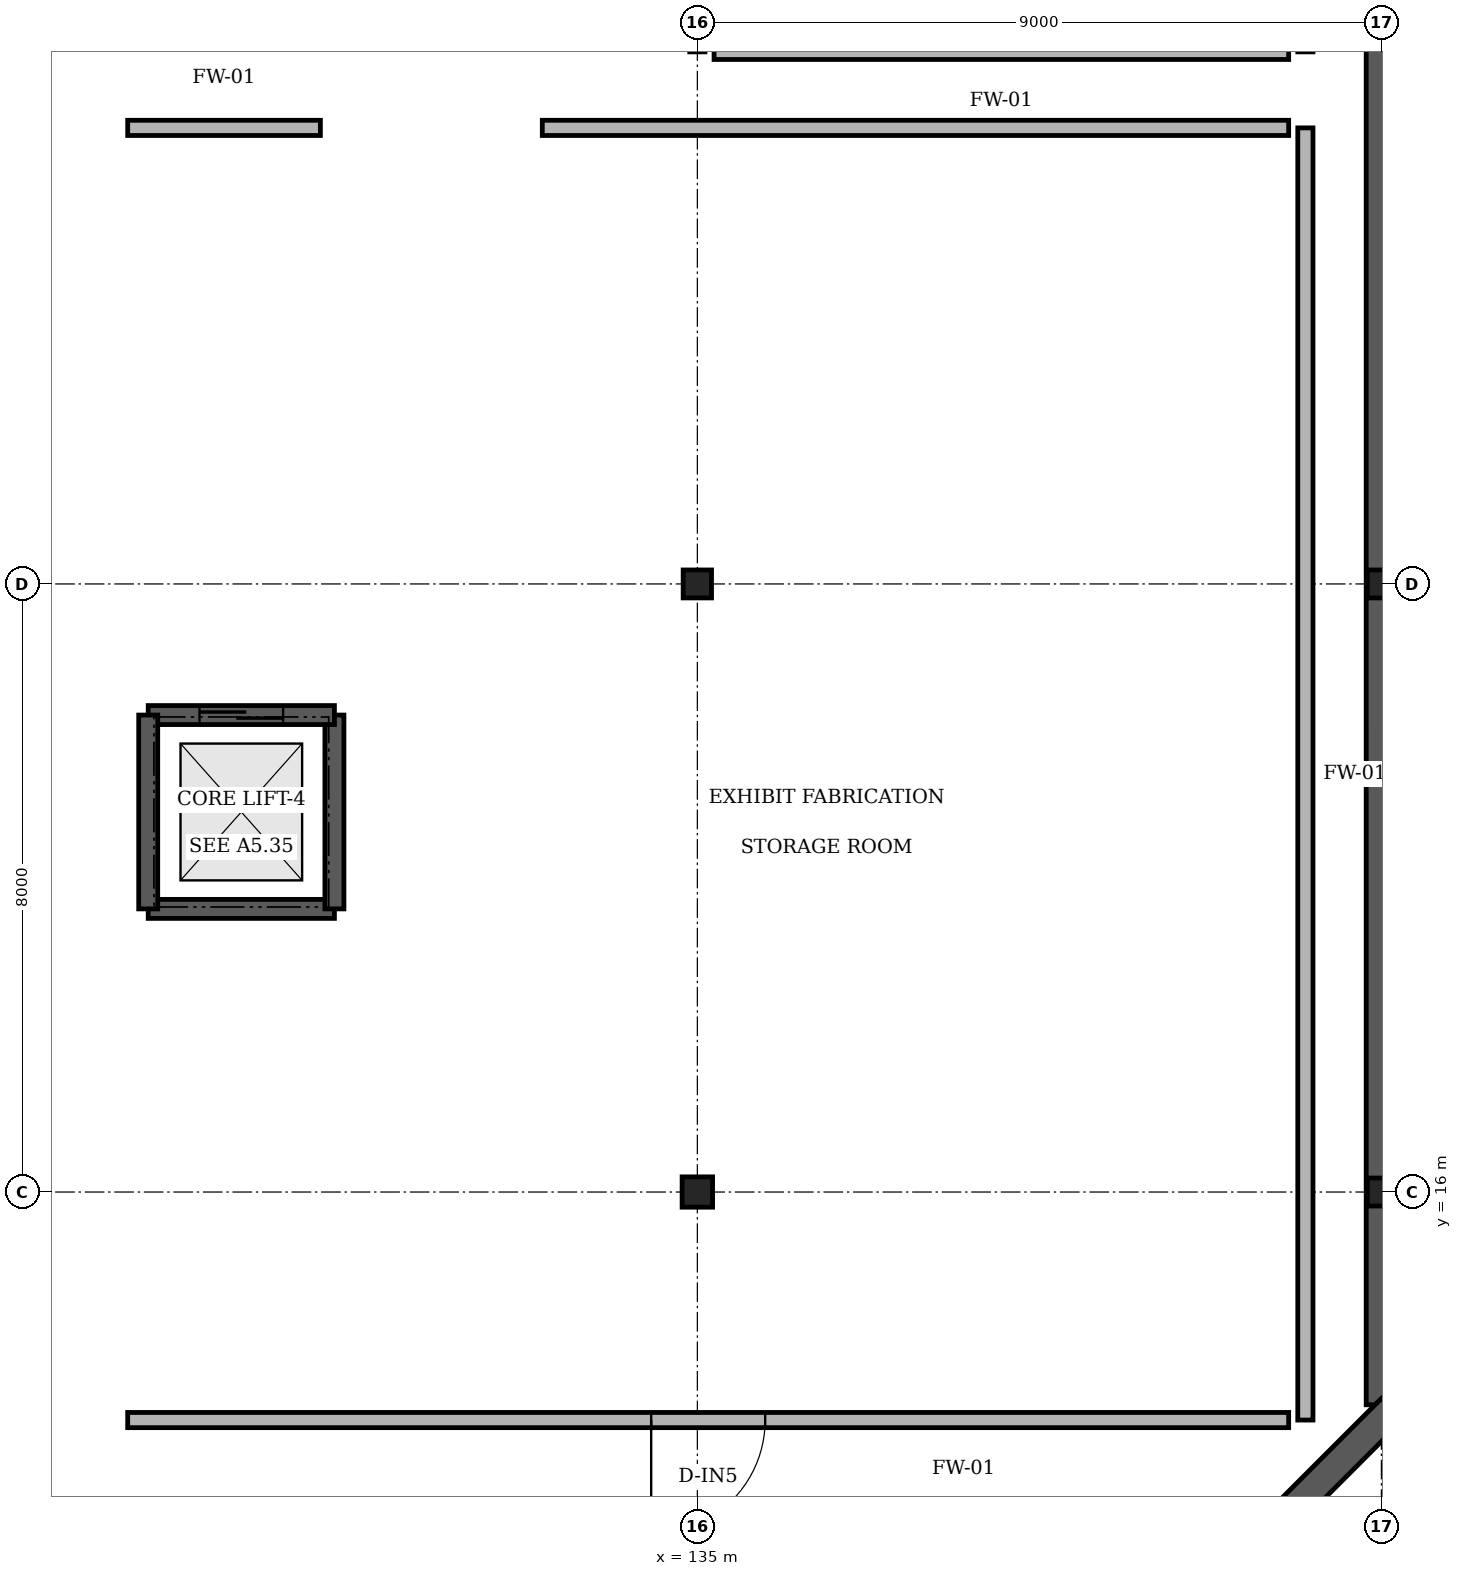
"""IFC4 building model, lengths in metres.
Left out: names, types, materials, properties, quantities, classifications, styles, units other than length and angle.
Written with IfcOpenShell. Run it as: python <this file> out.ifc"""

import sys

from ifc_helpers import new_model, si_unit, direction, frame, frame_2d, origin, origin_2d, place, context, subcontext, project, spatial, rectangle, i_section, extrude, element, fill, save


model = new_model("IFC4")
c1 = context("Model", 3, precision=1e-05, world=origin(), true_north=direction((0.0, 1.0)))
c2 = subcontext(c1, "Body", "Model", "MODEL_VIEW")
j1 = project(units=[si_unit("LENGTHUNIT", "METRE"), si_unit("PLANEANGLEUNIT", "RADIAN")], contexts=[c1])
p1 = place(None, origin())
s1 = spatial("IfcSite", under=j1, at=p1, CompositionType="ELEMENT")
p2 = place(p1, origin())
s2 = spatial("IfcBuilding", under=s1, at=p2, CompositionType="ELEMENT")
p3 = place(p2, frame((0.0, 0.0, -4.8)))
s3 = spatial("IfcBuildingStorey", under=s2, at=p3, CompositionType="ELEMENT", Elevation=-4.8)
p4 = place(p3, frame((135.0, 16.0, -0.35), z_axis=(0.0, 0.0, 1.0), x_axis=(1.0, 0.0, 0.0)))
e1 = element("IfcColumn", 1, at=p4, inside=s3, PredefinedType="COLUMN", context=c2, shape_type="SweptSolid", body=[
    extrude(i_section(OverallWidth=0.401, OverallDepth=0.399, WebThickness=0.025, FlangeThickness=0.04, FilletRadius=0.015, at=origin_2d()), origin(), (0.0, 0.0, 1.0), 5.15),
])
for number, where, z_axis, x_axis in (
    (2, (135.0, 24.0, -0.35), (0.0, 0.0, 1.0), (1.0, 0.0, 0.0)),
    (3, (144.0, 16.0, -0.35), (0.0, 0.0, 1.0), (1.0, 0.0, 0.0)),
    (4, (144.0, 24.0, -0.35), (0.0, 0.0, 1.0), (1.0, 0.0, 0.0)),
):
    element("IfcColumn", number, at=place(p3, frame(where, z_axis=z_axis, x_axis=x_axis)), inside=s3, PredefinedType="COLUMN", context=c2, shape_type="SweptSolid", body=[
        extrude(i_section(OverallWidth=0.373, OverallDepth=0.368, WebThickness=0.015, FlangeThickness=0.024, FilletRadius=0.015, at=origin_2d()), origin(), (0.0, 0.0, 1.0), 5.15),
    ])
p5 = place(p3, frame((144.0, 47.2, -0.35), z_axis=(0.0, 0.0, 1.0), x_axis=(0.0, -1.0, 0.0)))
e5 = element("IfcWall", 5, at=p5, inside=s3, PredefinedType="USERDEFINED", context=c2, shape_type="SweptSolid", body=[
    extrude(rectangle(XDim=33.999, YDim=0.4, at=frame_2d((17.0, 0.0))), origin(), (0.0, 0.0, 1.0), 3.9),
])
p6 = place(p3, frame((144.141, 13.143, -0.35), z_axis=(0.0, 0.0, 1.0), x_axis=(-0.706876640674, -0.70733684682, 0.0)))
e6 = element("IfcWall", 6, at=p6, inside=s3, PredefinedType="USERDEFINED", context=c2, shape_type="SweptSolid", body=[
    extrude(rectangle(XDim=2.122, YDim=0.4, at=frame_2d((1.061, 0.0))), origin(), (0.0, 0.0, 1.0), 3.9),
])
p7 = place(p3, frame((127.775, 19.725, -0.35), z_axis=(0.0, 0.0, 1.0), x_axis=(1.0, 0.0, 0.0)))
e7 = element("IfcWall", 7, at=p7, inside=s3, PredefinedType="SOLIDWALL", context=c2, shape_type="SweptSolid", body=[
    extrude(rectangle(XDim=2.45, YDim=0.25, at=frame_2d((1.225, 0.0))), origin(), (0.0, 0.0, 1.0), 5.15),
])
p8 = place(p3, frame((130.225, 19.725, -0.35), z_axis=(0.0, 0.0, 1.0), x_axis=(0.0, 1.0, 0.0)))
e8 = element("IfcWall", 8, at=p8, inside=s3, PredefinedType="SOLIDWALL", context=c2, shape_type="SweptSolid", body=[
    extrude(rectangle(XDim=2.55, YDim=0.25, at=frame_2d((1.275, 0.0))), origin(), (0.0, 0.0, 1.0), 5.15),
])
p9 = place(p3, frame((130.225, 22.275, -0.35), z_axis=(0.0, 0.0, 1.0), x_axis=(-1.0, 0.0, 0.0)))
e9 = element("IfcWall", 9, at=p9, inside=s3, PredefinedType="SOLIDWALL", context=c2, shape_type="SweptSolid", body=[
    extrude(rectangle(XDim=2.45, YDim=0.25, at=frame_2d((1.225, 0.0))), origin(), (0.0, 0.0, 1.0), 5.15),
])
p10 = place(p9, frame((0.675, 0.0, 0.35)))
e10 = element("IfcOpeningElement", 10, at=p10, cuts=e9, PredefinedType="OPENING", context=c2, shape_type="SweptSolid", body=[
    extrude(rectangle(XDim=1.1, YDim=2.2, at=frame_2d((0.55, 1.1))), frame((0.0, 0.135, 0.0), z_axis=(0.0, -1.0, 0.0), x_axis=(1.0, 0.0, 0.0)), (0.0, 0.0, 1.0), 0.27),
])
p11 = place(p3, frame((127.775, 22.275, -0.35), z_axis=(0.0, 0.0, 1.0), x_axis=(0.0, -1.0, 0.0)))
e11 = element("IfcWall", 11, at=p11, inside=s3, PredefinedType="SOLIDWALL", context=c2, shape_type="SweptSolid", body=[
    extrude(rectangle(XDim=2.55, YDim=0.25, at=frame_2d((1.275, 0.0))), origin(), (0.0, 0.0, 1.0), 5.15),
])
p12 = place(p3, frame((143.0, 30.0, 0.0), z_axis=(0.0, 0.0, 1.0), x_axis=(0.0, -1.0, 0.0)))
e12 = element("IfcWall", 12, at=p12, inside=s3, PredefinedType="SOLIDWALL", context=c2, shape_type="SweptSolid", body=[
    extrude(rectangle(XDim=17.0, YDim=0.2, at=frame_2d((8.5, 0.0))), origin(), (0.0, 0.0, 1.0), 3.15),
])
p13 = place(p3, frame((142.78, 13.0, 0.0), z_axis=(0.0, 0.0, 1.0), x_axis=(-1.0, 0.0, 0.0)))
e13 = element("IfcWall", 13, at=p13, inside=s3, PredefinedType="SOLIDWALL", context=c2, shape_type="SweptSolid", body=[
    extrude(rectangle(XDim=15.275, YDim=0.2, at=frame_2d((7.638, 0.0))), origin(), (0.0, 0.0, 1.0), 3.15),
])
p14 = place(p13, frame((6.887, 0.0, 0.0)))
e14 = element("IfcOpeningElement", 14, at=p14, cuts=e13, PredefinedType="OPENING", context=c2, shape_type="SweptSolid", body=[
    extrude(rectangle(XDim=1.5, YDim=2.2, at=frame_2d((0.75, 1.1))), frame((0.0, 0.11, 0.0), z_axis=(0.0, -1.0, 0.0), x_axis=(1.0, 0.0, 0.0)), (0.0, 0.0, 1.0), 0.22),
])
p15 = place(p3, frame((127.505, 30.0, 0.0), z_axis=(0.0, 0.0, 1.0), x_axis=(1.0, 0.0, 0.0)))
e15 = element("IfcWall", 15, at=p15, inside=s3, PredefinedType="SOLIDWALL", context=c2, shape_type="SweptSolid", body=[
    extrude(rectangle(XDim=2.535, YDim=0.2, at=frame_2d((1.268, 0.0))), origin(), (0.0, 0.0, 1.0), 3.15),
])
p16 = place(p3, frame((132.96, 30.0, 0.0), z_axis=(0.0, 0.0, 1.0), x_axis=(1.0, 0.0, 0.0)))
e16 = element("IfcWall", 16, at=p16, inside=s3, PredefinedType="SOLIDWALL", context=c2, shape_type="SweptSolid", body=[
    extrude(rectangle(XDim=9.82, YDim=0.2, at=frame_2d((4.91, 0.0))), origin(), (0.0, 0.0, 1.0), 3.15),
])
p17 = place(p3, frame((143.0, 46.78, 0.0), z_axis=(0.0, 0.0, 1.0), x_axis=(0.0, -1.0, 0.0)))
e17 = element("IfcWall", 17, at=p17, inside=s3, PredefinedType="SOLIDWALL", context=c2, shape_type="SweptSolid", body=[
    extrude(rectangle(XDim=15.78, YDim=0.2, at=frame_2d((7.89, 0.0))), origin(), (0.0, 0.0, 1.0), 3.15),
])
p18 = place(p3, frame((142.78, 31.0, 0.0), z_axis=(0.0, 0.0, 1.0), x_axis=(-1.0, 0.0, 0.0)))
e18 = element("IfcWall", 18, at=p18, inside=s3, PredefinedType="SOLIDWALL", context=c2, shape_type="SweptSolid", body=[
    extrude(rectangle(XDim=7.56, YDim=0.2, at=frame_2d((3.78, 0.0))), origin(), (0.0, 0.0, 1.0), 3.15),
])
p19 = place(p10, origin())
e19 = element("IfcDoor", 19, at=p19, inside=s3, OperationType="SLIDING_TO_LEFT", PredefinedType="DOOR", context=c2, shape_type="SweptSolid", body=[
    extrude(rectangle(XDim=1.1, YDim=2.2, at=frame_2d((0.55, 1.1))), frame((0.0, 0.025, 0.0), z_axis=(0.0, -1.0, 0.0), x_axis=(1.0, 0.0, 0.0)), (0.0, 0.0, 1.0), 0.05),
])
fill(e10, e19)
p20 = place(p14, origin())
e20 = element("IfcDoor", 20, at=p20, inside=s3, OperationType="SINGLE_SWING_RIGHT", PredefinedType="DOOR", context=c2, shape_type="SweptSolid", body=[
    extrude(rectangle(XDim=1.5, YDim=2.2, at=frame_2d((0.75, 1.1))), frame((0.0, 0.025, 0.0), z_axis=(0.0, -1.0, 0.0), x_axis=(1.0, 0.0, 0.0)), (0.0, 0.0, 1.0), 0.05),
])
fill(e14, e20)
save(model, sys.argv[1])
